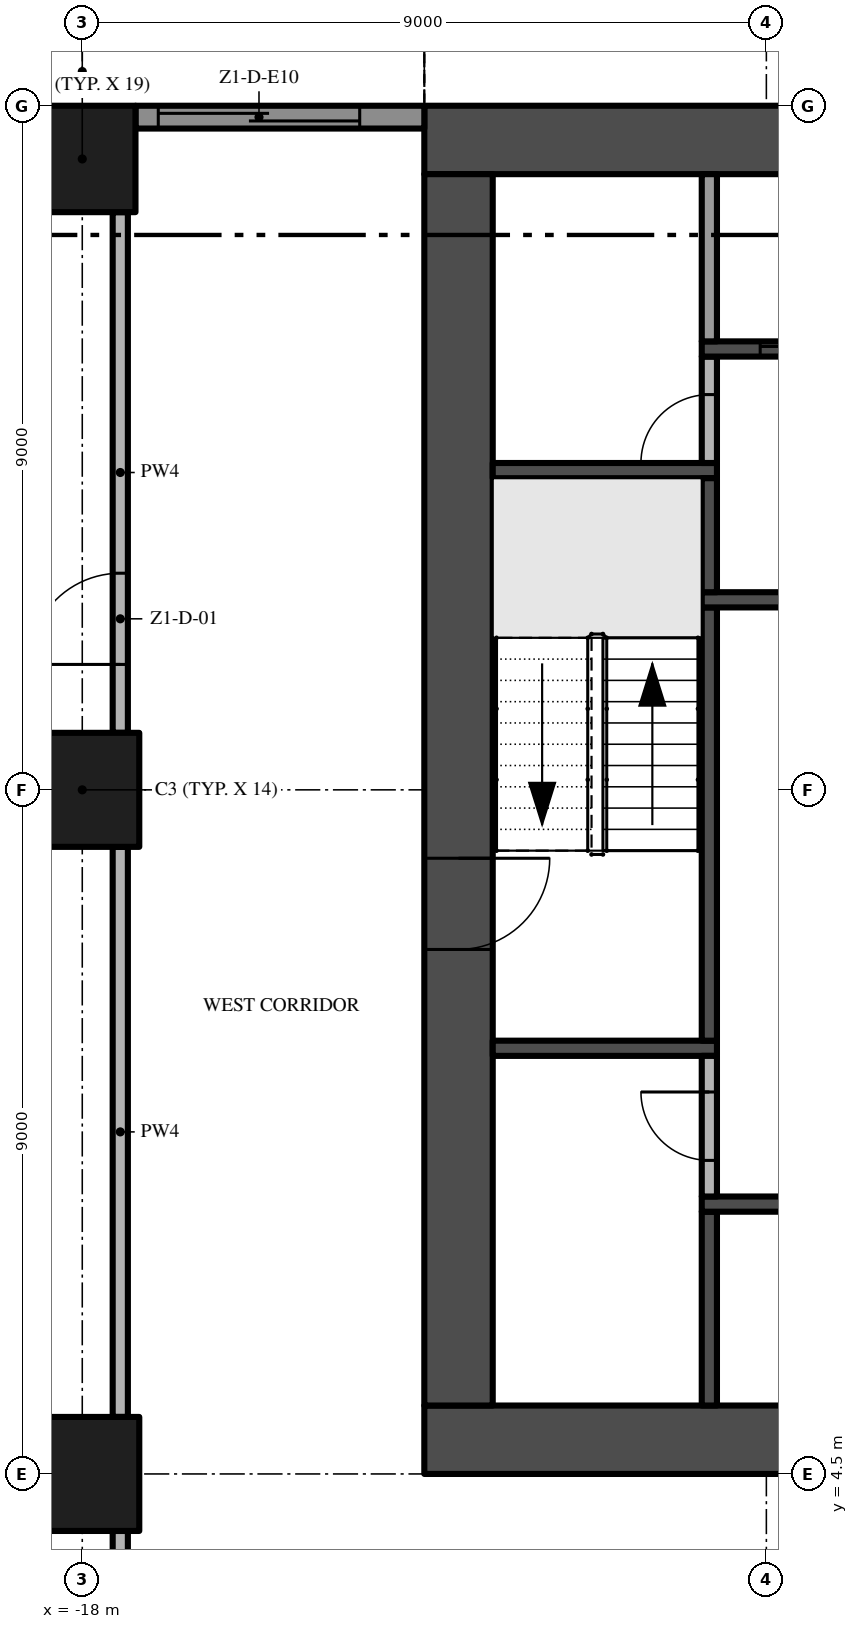
"""IFC4 building model, lengths in metres.
Left out: names, types, materials, properties, quantities, classifications, styles, units other than length and angle.
Written with IfcOpenShell. Run it as: python <this file> out.ifc"""

import sys

from ifc_helpers import new_model, si_unit, direction, frame, frame_2d, origin, origin_2d, place, context, subcontext, project, spatial, polyline, rectangle, outline, extrude, element, fill, save


model = new_model("IFC4")
c1 = context("Model", 3, precision=1e-05, world=origin(), true_north=direction((0.0, 1.0)))
c2 = subcontext(c1, "Body", "Model", "MODEL_VIEW")
j1 = project(units=[si_unit("LENGTHUNIT", "METRE"), si_unit("PLANEANGLEUNIT", "RADIAN")], contexts=[c1])
p1 = place(None, origin())
s1 = spatial("IfcSite", under=j1, at=p1, CompositionType="ELEMENT")
p2 = place(p1, origin())
s2 = spatial("IfcBuilding", under=s1, at=p2, CompositionType="ELEMENT")
p3 = place(p2, frame((0.0, 0.0, 53.0)))
s3 = spatial("IfcBuildingStorey", under=s2, at=p3, CompositionType="ELEMENT", Elevation=53.0)
p4 = place(p3, frame((-13.5, 4.95, -0.3), z_axis=(0.0, 0.0, 1.0), x_axis=(1.0, 0.0, 0.0)))
e1 = element("IfcWall", 1, at=p4, inside=s3, PredefinedType="SHEAR", context=c2, shape_type="SweptSolid", body=[
    extrude(rectangle(XDim=27.0, YDim=0.9, at=frame_2d((13.5, 0.0))), origin(), (0.0, 0.0, 1.0), 3.8),
])
p5 = place(p4, frame((12.0, 0.0, 0.3)))
e2 = element("IfcOpeningElement", 2, at=p5, cuts=e1, PredefinedType="OPENING", context=c2, shape_type="SweptSolid", body=[
    extrude(rectangle(XDim=3.0, YDim=2.4, at=frame_2d((1.5, 1.2))), frame((0.0, 0.46, 0.0), z_axis=(0.0, -1.0, 0.0), x_axis=(1.0, 0.0, 0.0)), (0.0, 0.0, 1.0), 0.92),
])
p6 = place(p4, frame((4.9, 0.0, 0.3)))
e3 = element("IfcOpeningElement", 3, at=p6, cuts=e1, PredefinedType="OPENING", context=c2, shape_type="SweptSolid", body=[
    extrude(rectangle(XDim=1.2, YDim=2.2, at=frame_2d((0.6, 1.1))), frame((0.0, 0.46, 0.0), z_axis=(0.0, -1.0, 0.0), x_axis=(1.0, 0.0, 0.0)), (0.0, 0.0, 1.0), 0.92),
])
p7 = place(p4, frame((20.75, 0.0, 0.3)))
e4 = element("IfcOpeningElement", 4, at=p7, cuts=e1, PredefinedType="OPENING", context=c2, shape_type="SweptSolid", body=[
    extrude(rectangle(XDim=1.5, YDim=2.2, at=frame_2d((0.75, 1.1))), frame((0.0, 0.46, 0.0), z_axis=(0.0, -1.0, 0.0), x_axis=(1.0, 0.0, 0.0)), (0.0, 0.0, 1.0), 0.92),
])
p8 = place(p4, frame((17.4, 0.0, 0.3)))
e5 = element("IfcOpeningElement", 5, at=p8, cuts=e1, PredefinedType="OPENING", context=c2, shape_type="SweptSolid", body=[
    extrude(rectangle(XDim=1.2, YDim=2.2, at=frame_2d((0.6, 1.1))), frame((0.0, 0.46, 0.0), z_axis=(0.0, -1.0, 0.0), x_axis=(1.0, 0.0, 0.0)), (0.0, 0.0, 1.0), 0.92),
])
p9 = place(p3, frame((13.5, 22.05, -0.3), z_axis=(0.0, 0.0, 1.0), x_axis=(-1.0, 0.0, 0.0)))
e6 = element("IfcWall", 6, at=p9, inside=s3, PredefinedType="SHEAR", context=c2, shape_type="SweptSolid", body=[
    extrude(rectangle(XDim=27.0, YDim=0.9, at=frame_2d((13.5, 0.0))), origin(), (0.0, 0.0, 1.0), 3.8),
])
p10 = place(p3, frame((-13.05, 21.6, -0.3), z_axis=(0.0, 0.0, 1.0), x_axis=(0.0, -1.0, 0.0)))
e7 = element("IfcWall", 7, at=p10, inside=s3, PredefinedType="SHEAR", context=c2, shape_type="SweptSolid", body=[
    extrude(rectangle(XDim=16.2, YDim=0.9, at=frame_2d((8.1, 0.0))), origin(), (0.0, 0.0, 1.0), 3.8),
])
p11 = place(p10, frame((9.0, 0.0, 0.3)))
e8 = element("IfcOpeningElement", 8, at=p11, cuts=e7, PredefinedType="OPENING", context=c2, shape_type="SweptSolid", body=[
    extrude(rectangle(XDim=1.2, YDim=2.2, at=frame_2d((0.6, 1.1))), frame((0.0, 0.46, 0.0), z_axis=(0.0, -1.0, 0.0), x_axis=(1.0, 0.0, 0.0)), (0.0, 0.0, 1.0), 0.92),
])
p12 = place(p3, frame((-18.0, 13.5, 0.0), z_axis=(0.0, 0.0, 1.0), x_axis=(1.0, 0.0, 0.0)))
e9 = element("IfcColumn", 9, at=p12, inside=s3, PredefinedType="COLUMN", context=c2, shape_type="SweptSolid", body=[
    extrude(rectangle(XDim=1.5, YDim=1.5, at=origin_2d()), origin(), (0.0, 0.0, 1.0), 3.5),
])
p13 = place(p3, frame((-18.0, 21.8, 0.0), z_axis=(0.0, 0.0, 1.0), x_axis=(1.0, 0.0, 0.0)))
e10 = element("IfcColumn", 10, at=p13, inside=s3, PredefinedType="COLUMN", context=c2, shape_type="SweptSolid", body=[
    extrude(rectangle(XDim=1.4, YDim=1.4, at=origin_2d()), origin(), (0.0, 0.0, 1.0), 3.5),
])
p14 = place(p3, frame((-18.0, 4.5, 0.0), z_axis=(0.0, 0.0, 1.0), x_axis=(1.0, 0.0, 0.0)))
e11 = element("IfcColumn", 11, at=p14, inside=s3, PredefinedType="COLUMN", context=c2, shape_type="SweptSolid", body=[
    extrude(rectangle(XDim=1.5, YDim=1.5, at=origin_2d()), origin(), (0.0, 0.0, 1.0), 3.5),
])
p15 = place(p3, frame((-17.3, 22.35, 0.0), z_axis=(0.0, 0.0, 1.0), x_axis=(1.0, 0.0, 0.0)))
e12 = element("IfcWall", 12, at=p15, inside=s3, PredefinedType="SOLIDWALL", context=c2, shape_type="SweptSolid", body=[
    extrude(rectangle(XDim=3.8, YDim=0.3, at=frame_2d((1.9, 0.0))), origin(), (0.0, 0.0, 1.0), 3.5),
])
p16 = place(p15, frame((0.3, 0.0, 0.0)))
e13 = element("IfcOpeningElement", 13, at=p16, cuts=e12, PredefinedType="OPENING", context=c2, shape_type="SweptSolid", body=[
    extrude(rectangle(XDim=2.65, YDim=2.4, at=frame_2d((1.325, 1.2))), frame((0.0, 0.16, 0.0), z_axis=(0.0, -1.0, 0.0), x_axis=(1.0, 0.0, 0.0)), (0.0, 0.0, 1.0), 0.32),
])
p17 = place(p3, origin())
e14 = element("IfcWall", 14, at=p17, inside=s3, PredefinedType="USERDEFINED", context=c2, shape_type="SweptSolid", body=[
    extrude(outline(polyline([(-13.5, 25.5), (-15.0, 25.271), (-16.5, 24.671), (-18.0, 23.929), (-19.5, 23.329), (-21.0, 23.1), (-22.5, 23.329), (-22.538, 23.082), (-21.0, 22.847), (-19.434, 23.086), (-17.898, 23.701), (-16.398, 24.442), (-14.934, 25.028), (-13.462, 25.253), (-13.5, 25.5)])), origin(), (0.0, 0.0, 1.0), 0.9),
])
for number, where, z_axis, x_axis in (
    (15, (-12.6, 10.1, 0.0), (0.0, 0.0, 1.0), (1.0, 0.0, 0.0)),
    (16, (-12.6, 17.7, 0.0), (0.0, 0.0, 1.0), (1.0, 0.0, 0.0)),
):
    element("IfcWall", number, at=place(p3, frame(where, z_axis=z_axis, x_axis=x_axis)), inside=s3, PredefinedType="SHEAR", context=c2, shape_type="SweptSolid", body=[
        extrude(rectangle(XDim=2.95, YDim=0.2, at=frame_2d((1.475, 0.0))), origin(), (0.0, 0.0, 1.0), 3.5),
    ])
p18 = place(p3, frame((-9.75, 5.4, 0.0), z_axis=(0.0, 0.0, 1.0), x_axis=(0.0, 1.0, 0.0)))
e17 = element("IfcWall", 17, at=p18, inside=s3, PredefinedType="SHEAR", context=c2, shape_type="SweptSolid", body=[
    extrude(rectangle(XDim=2.55, YDim=0.2, at=frame_2d((1.275, 0.0))), origin(), (0.0, 0.0, 1.0), 3.5),
])
p19 = place(p3, frame((-9.85, 8.05, 0.0), z_axis=(0.0, 0.0, 1.0), x_axis=(1.0, 0.0, 0.0)))
e18 = element("IfcWall", 18, at=p19, inside=s3, PredefinedType="SHEAR", context=c2, shape_type="SweptSolid", body=[
    extrude(rectangle(XDim=8.35, YDim=0.2, at=frame_2d((4.175, 0.0))), origin(), (0.0, 0.0, 1.0), 3.5),
])
p20 = place(p3, frame((-9.75, 8.15, 0.0), z_axis=(0.0, 0.0, 1.0), x_axis=(0.0, 1.0, 0.0)))
e19 = element("IfcWall", 19, at=p20, inside=s3, PredefinedType="PARTITIONING", context=c2, shape_type="SweptSolid", body=[
    extrude(rectangle(XDim=1.85, YDim=0.2, at=frame_2d((0.925, 0.0))), origin(), (0.0, 0.0, 1.0), 3.5),
])
p21 = place(p20, frame((0.475, 0.0, 0.0)))
e20 = element("IfcOpeningElement", 20, at=p21, cuts=e19, PredefinedType="OPENING", context=c2, shape_type="SweptSolid", body=[
    extrude(rectangle(XDim=0.9, YDim=2.1, at=frame_2d((0.45, 1.05))), frame((0.0, 0.11, 0.0), z_axis=(0.0, -1.0, 0.0), x_axis=(1.0, 0.0, 0.0)), (0.0, 0.0, 1.0), 0.22),
])
p22 = place(p3, frame((-9.75, 10.2, 0.0), z_axis=(0.0, 0.0, 1.0), x_axis=(0.0, 1.0, 0.0)))
e21 = element("IfcWall", 21, at=p22, inside=s3, PredefinedType="SHEAR", context=c2, shape_type="SweptSolid", body=[
    extrude(rectangle(XDim=5.7, YDim=0.2, at=frame_2d((2.85, 0.0))), origin(), (0.0, 0.0, 1.0), 3.5),
])
p23 = place(p3, frame((-1.5, 16.0, 0.0), z_axis=(0.0, 0.0, 1.0), x_axis=(-1.0, 0.0, 0.0)))
e22 = element("IfcWall", 22, at=p23, inside=s3, PredefinedType="SHEAR", context=c2, shape_type="SweptSolid", body=[
    extrude(rectangle(XDim=8.35, YDim=0.2, at=frame_2d((4.175, 0.0))), origin(), (0.0, 0.0, 1.0), 3.5),
])
p24 = place(p23, frame((6.162, 0.0, 0.0)))
e23 = element("IfcOpeningElement", 23, at=p24, cuts=e22, PredefinedType="OPENING", context=c2, shape_type="SweptSolid", body=[
    extrude(rectangle(XDim=0.9, YDim=2.1, at=frame_2d((0.45, 1.05))), frame((0.0, 0.11, 0.0), z_axis=(0.0, -1.0, 0.0), x_axis=(1.0, 0.0, 0.0)), (0.0, 0.0, 1.0), 0.22),
])
p25 = place(p3, frame((-9.75, 16.1, 0.0), z_axis=(0.0, 0.0, 1.0), x_axis=(0.0, 1.0, 0.0)))
e24 = element("IfcWall", 24, at=p25, inside=s3, PredefinedType="SHEAR", context=c2, shape_type="SweptSolid", body=[
    extrude(rectangle(XDim=1.5, YDim=0.2, at=frame_2d((0.75, 0.0))), origin(), (0.0, 0.0, 1.0), 3.5),
])
p26 = place(p3, frame((-9.75, 17.8, 0.0), z_axis=(0.0, 0.0, 1.0), x_axis=(0.0, 1.0, 0.0)))
e25 = element("IfcWall", 25, at=p26, inside=s3, PredefinedType="PARTITIONING", context=c2, shape_type="SweptSolid", body=[
    extrude(rectangle(XDim=1.4, YDim=0.2, at=frame_2d((0.7, 0.0))), origin(), (0.0, 0.0, 1.0), 3.5),
])
p27 = place(p26, origin())
e26 = element("IfcOpeningElement", 26, at=p27, cuts=e25, PredefinedType="OPENING", context=c2, shape_type="SweptSolid", body=[
    extrude(rectangle(XDim=0.9, YDim=2.1, at=frame_2d((0.45, 1.05))), frame((0.0, 0.11, 0.0), z_axis=(0.0, -1.0, 0.0), x_axis=(1.0, 0.0, 0.0)), (0.0, 0.0, 1.0), 0.22),
])
p28 = place(p3, frame((-9.85, 19.3, 0.0), z_axis=(0.0, 0.0, 1.0), x_axis=(1.0, 0.0, 0.0)))
e27 = element("IfcWall", 27, at=p28, inside=s3, PredefinedType="SHEAR", context=c2, shape_type="SweptSolid", body=[
    extrude(rectangle(XDim=19.7, YDim=0.2, at=frame_2d((9.85, 0.0))), origin(), (0.0, 0.0, 1.0), 3.5),
])
p29 = place(p28, frame((0.769, 0.0, 0.0)))
e28 = element("IfcOpeningElement", 28, at=p29, cuts=e27, PredefinedType="OPENING", context=c2, shape_type="SweptSolid", body=[
    extrude(rectangle(XDim=1.1, YDim=2.1, at=frame_2d((0.55, 1.05))), frame((0.0, 0.11, 0.0), z_axis=(0.0, -1.0, 0.0), x_axis=(1.0, 0.0, 0.0)), (0.0, 0.0, 1.0), 0.22),
])
p30 = place(p28, frame((3.206, 0.0, 0.0)))
e29 = element("IfcOpeningElement", 29, at=p30, cuts=e27, PredefinedType="OPENING", context=c2, shape_type="SweptSolid", body=[
    extrude(rectangle(XDim=1.1, YDim=2.1, at=frame_2d((0.55, 1.05))), frame((0.0, 0.11, 0.0), z_axis=(0.0, -1.0, 0.0), x_axis=(1.0, 0.0, 0.0)), (0.0, 0.0, 1.0), 0.22),
])
p31 = place(p28, frame((5.644, 0.0, 0.0)))
e30 = element("IfcOpeningElement", 30, at=p31, cuts=e27, PredefinedType="OPENING", context=c2, shape_type="SweptSolid", body=[
    extrude(rectangle(XDim=1.1, YDim=2.1, at=frame_2d((0.55, 1.05))), frame((0.0, 0.11, 0.0), z_axis=(0.0, -1.0, 0.0), x_axis=(1.0, 0.0, 0.0)), (0.0, 0.0, 1.0), 0.22),
])
p32 = place(p28, frame((8.081, 0.0, 0.0)))
e31 = element("IfcOpeningElement", 31, at=p32, cuts=e27, PredefinedType="OPENING", context=c2, shape_type="SweptSolid", body=[
    extrude(rectangle(XDim=1.1, YDim=2.1, at=frame_2d((0.55, 1.05))), frame((0.0, 0.11, 0.0), z_axis=(0.0, -1.0, 0.0), x_axis=(1.0, 0.0, 0.0)), (0.0, 0.0, 1.0), 0.22),
])
p33 = place(p3, frame((-9.75, 19.4, 0.0), z_axis=(0.0, 0.0, 1.0), x_axis=(0.0, 1.0, 0.0)))
e32 = element("IfcWall", 32, at=p33, inside=s3, PredefinedType="PARTITIONING", context=c2, shape_type="SweptSolid", body=[
    extrude(rectangle(XDim=2.2, YDim=0.2, at=frame_2d((1.1, 0.0))), origin(), (0.0, 0.0, 1.0), 3.5),
])
p34 = place(p3, frame((-17.5, -0.2, 0.0), z_axis=(0.0, 0.0, 1.0), x_axis=(0.0, 1.0, 0.0)))
e33 = element("IfcWall", 33, at=p34, inside=s3, PredefinedType="PARTITIONING", context=c2, shape_type="SweptSolid", body=[
    extrude(rectangle(XDim=3.95, YDim=0.2, at=frame_2d((1.975, 0.0))), origin(), (0.0, 0.0, 1.0), 3.5),
])
p35 = place(p3, frame((-17.5, 5.25, 0.0), z_axis=(0.0, 0.0, 1.0), x_axis=(0.0, 1.0, 0.0)))
e34 = element("IfcWall", 34, at=p35, inside=s3, PredefinedType="PARTITIONING", context=c2, shape_type="SweptSolid", body=[
    extrude(rectangle(XDim=7.5, YDim=0.2, at=frame_2d((3.75, 0.0))), origin(), (0.0, 0.0, 1.0), 3.5),
])
p36 = place(p3, frame((-17.5, 14.25, 0.0), z_axis=(0.0, 0.0, 1.0), x_axis=(0.0, 1.0, 0.0)))
e35 = element("IfcWall", 35, at=p36, inside=s3, PredefinedType="PARTITIONING", context=c2, shape_type="SweptSolid", body=[
    extrude(rectangle(XDim=6.85, YDim=0.2, at=frame_2d((3.425, 0.0))), origin(), (0.0, 0.0, 1.0), 3.5),
])
p37 = place(p36, frame((0.9, 0.0, 0.0)))
e36 = element("IfcOpeningElement", 36, at=p37, cuts=e35, PredefinedType="OPENING", context=c2, shape_type="SweptSolid", body=[
    extrude(rectangle(XDim=1.2, YDim=2.4, at=frame_2d((0.6, 1.2))), frame((0.0, 0.11, 0.0), z_axis=(0.0, -1.0, 0.0), x_axis=(1.0, 0.0, 0.0)), (0.0, 0.0, 1.0), 0.22),
])
p38 = place(p16, origin())
e37 = element("IfcDoor", 37, at=p38, inside=s3, OperationType="SINGLE_SWING_LEFT", PredefinedType="DOOR", context=c2, shape_type="SweptSolid", body=[
    extrude(rectangle(XDim=2.65, YDim=2.4, at=frame_2d((1.325, 1.2))), frame((0.0, 0.025, 0.0), z_axis=(0.0, -1.0, 0.0), x_axis=(1.0, 0.0, 0.0)), (0.0, 0.0, 1.0), 0.05),
])
fill(e13, e37)
p39 = place(p11, frame((1.2, 0.0, 0.0), z_axis=(0.0, 0.0, 1.0), x_axis=(-1.0, 0.0, 0.0)))
e38 = element("IfcDoor", 38, at=p39, inside=s3, OperationType="SINGLE_SWING_RIGHT", PredefinedType="DOOR", context=c2, shape_type="SweptSolid", body=[
    extrude(rectangle(XDim=1.2, YDim=2.2, at=frame_2d((0.6, 1.1))), frame((0.0, 0.025, 0.0), z_axis=(0.0, -1.0, 0.0), x_axis=(1.0, 0.0, 0.0)), (0.0, 0.0, 1.0), 0.05),
])
fill(e8, e38)
p40 = place(p29, origin())
e39 = element("IfcDoor", 39, at=p40, inside=s3, OperationType="SLIDING_TO_LEFT", PredefinedType="DOOR", context=c2, shape_type="SweptSolid", body=[
    extrude(rectangle(XDim=1.1, YDim=2.1, at=frame_2d((0.55, 1.05))), frame((0.0, 0.025, 0.0), z_axis=(0.0, -1.0, 0.0), x_axis=(1.0, 0.0, 0.0)), (0.0, 0.0, 1.0), 0.05),
])
fill(e28, e39)
p41 = place(p27, origin())
e40 = element("IfcDoor", 40, at=p41, inside=s3, OperationType="SINGLE_SWING_LEFT", PredefinedType="DOOR", context=c2, shape_type="SweptSolid", body=[
    extrude(rectangle(XDim=0.9, YDim=2.1, at=frame_2d((0.45, 1.05))), frame((0.0, 0.025, 0.0), z_axis=(0.0, -1.0, 0.0), x_axis=(1.0, 0.0, 0.0)), (0.0, 0.0, 1.0), 0.05),
])
fill(e26, e40)
p42 = place(p21, origin())
e41 = element("IfcDoor", 41, at=p42, inside=s3, OperationType="SINGLE_SWING_RIGHT", PredefinedType="DOOR", context=c2, shape_type="SweptSolid", body=[
    extrude(rectangle(XDim=0.9, YDim=2.1, at=frame_2d((0.45, 1.05))), frame((0.0, 0.025, 0.0), z_axis=(0.0, -1.0, 0.0), x_axis=(1.0, 0.0, 0.0)), (0.0, 0.0, 1.0), 0.05),
])
fill(e20, e41)
p43 = place(p37, origin())
e42 = element("IfcDoor", 42, at=p43, inside=s3, OperationType="SINGLE_SWING_LEFT", PredefinedType="DOOR", context=c2, shape_type="SweptSolid", body=[
    extrude(rectangle(XDim=1.2, YDim=2.4, at=frame_2d((0.6, 1.2))), frame((0.0, 0.025, 0.0), z_axis=(0.0, -1.0, 0.0), x_axis=(1.0, 0.0, 0.0)), (0.0, 0.0, 1.0), 0.05),
])
fill(e36, e42)
save(model, sys.argv[1])
